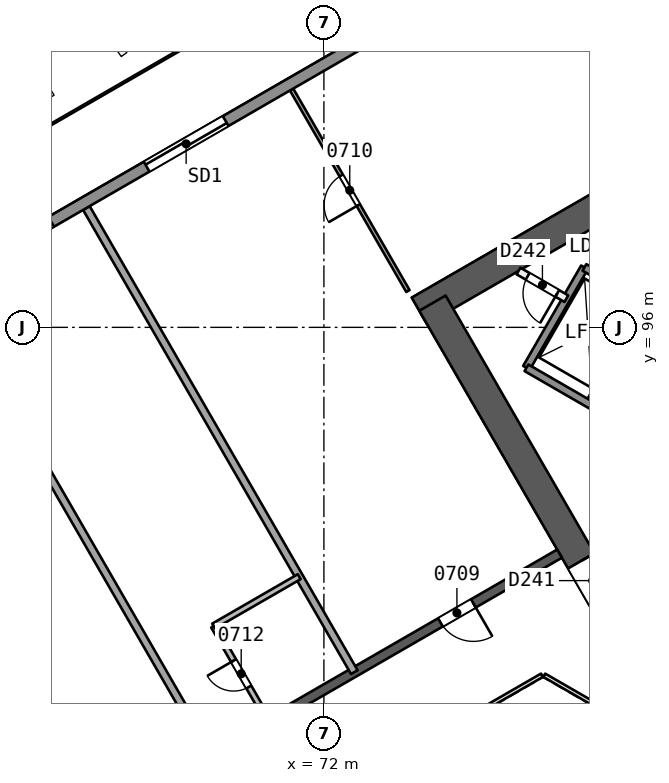
"""IFC4 building model, lengths in metres.
Left out: names, types, materials, properties, quantities, classifications, styles, units other than length and angle.
Written with IfcOpenShell. Run it as: python <this file> out.ifc"""

import sys

from ifc_helpers import new_model, si_unit, direction, frame, frame_2d, origin, place, context, subcontext, project, spatial, rectangle, extrude, element, fill, save


model = new_model("IFC4")
c1 = context("Model", 3, precision=1e-05, world=origin(), true_north=direction((0.0, 1.0)))
c2 = subcontext(c1, "Body", "Model", "MODEL_VIEW")
j1 = project(units=[si_unit("LENGTHUNIT", "METRE"), si_unit("PLANEANGLEUNIT", "RADIAN")], contexts=[c1])
p1 = place(None, origin())
s1 = spatial("IfcSite", under=j1, at=p1, CompositionType="ELEMENT")
p2 = place(p1, origin())
s2 = spatial("IfcBuilding", under=s1, at=p2, CompositionType="ELEMENT")
p3 = place(p2, frame((0.0, 0.0, 37.4)))
s3 = spatial("IfcBuildingStorey", under=s2, at=p3, CompositionType="ELEMENT", Elevation=37.4)
p4 = place(p3, frame((65.538, 80.0, 0.0), z_axis=(0.0, 0.0, 1.0), x_axis=(-0.49999662545, 0.866027352073, 0.0)))
e1 = element("IfcWall", 1, at=p4, inside=s3, PredefinedType="SHEAR", context=c2, shape_type="SweptSolid", body=[
    extrude(rectangle(XDim=10.149, YDim=0.8, at=frame_2d((5.074, 0.0))), origin(), (0.0, 0.0, 1.0), 3.7),
])
p5 = place(p4, frame((0.719, 0.0, 0.0)))
e2 = element("IfcOpeningElement", 2, at=p5, cuts=e1, PredefinedType="OPENING", context=c2, shape_type="SweptSolid", body=[
    extrude(rectangle(XDim=1.2, YDim=2.1, at=frame_2d((0.6, 1.05))), frame((0.0, 0.411, 0.0), z_axis=(0.0, -1.0, 0.0), x_axis=(1.0, 0.0, 0.0)), (0.0, 0.0, 1.0), 0.821),
])
p6 = place(p3, frame((86.723, 103.488, 0.0), z_axis=(0.0, 0.0, 1.0), x_axis=(-0.866032504327, -0.499987701298, 0.0)))
e3 = element("IfcWall", 3, at=p6, inside=s3, PredefinedType="SHEAR", context=c2, shape_type="SweptSolid", body=[
    extrude(rectangle(XDim=14.102, YDim=0.8, at=frame_2d((7.051, 0.0))), origin(), (0.0, 0.0, 1.0), 3.7),
])
p7 = place(p3, frame((74.856, 96.637, 0.0), z_axis=(0.0, 0.0, 1.0), x_axis=(0.499993500917, -0.866029155999, 0.0)))
e4 = element("IfcWall", 4, at=p7, inside=s3, PredefinedType="SHEAR", context=c2, shape_type="SweptSolid", body=[
    extrude(rectangle(XDim=9.98, YDim=0.8, at=frame_2d((4.99, 0.0))), origin(), (0.0, 0.0, 1.0), 3.7),
])
p8 = place(p7, frame((7.83, 0.0, 0.0)))
e5 = element("IfcOpeningElement", 5, at=p8, cuts=e4, PredefinedType="OPENING", context=c2, shape_type="SweptSolid", body=[
    extrude(rectangle(XDim=1.2, YDim=2.1, at=frame_2d((0.6, 1.05))), frame((0.0, 0.411, 0.0), z_axis=(0.0, -1.0, 0.0), x_axis=(1.0, 0.0, 0.0)), (0.0, 0.0, 1.0), 0.821),
])
p9 = place(p3, frame((78.2, 90.046, 0.0), z_axis=(0.0, 0.0, 1.0), x_axis=(-0.866026492143, -0.499998114903, 0.0)))
e6 = element("IfcWall", 6, at=p9, inside=s3, PredefinedType="SHEAR", context=c2, shape_type="SweptSolid", body=[
    extrude(rectangle(XDim=15.588, YDim=0.25, at=frame_2d((7.794, 0.0))), origin(), (0.0, 0.0, 1.0), 3.2),
])
p10 = place(p9, frame((2.618, 0.0, 0.0)))
e7 = element("IfcOpeningElement", 7, at=p10, cuts=e6, PredefinedType="OPENING", context=c2, shape_type="SweptSolid", body=[
    extrude(rectangle(XDim=1.0, YDim=2.1, at=frame_2d((0.5, 1.05))), frame((0.0, 0.135, 0.0), z_axis=(0.0, -1.0, 0.0), x_axis=(1.0, 0.0, 0.0)), (0.0, 0.0, 1.0), 0.271),
])
p11 = place(p9, frame((9.218, 0.0, 0.0)))
e8 = element("IfcOpeningElement", 8, at=p11, cuts=e6, PredefinedType="OPENING", context=c2, shape_type="SweptSolid", body=[
    extrude(rectangle(XDim=1.0, YDim=2.1, at=frame_2d((0.5, 1.05))), frame((0.0, 0.135, 0.0), z_axis=(0.0, -1.0, 0.0), x_axis=(1.0, 0.0, 0.0)), (0.0, 0.0, 1.0), 0.271),
])
p12 = place(p9, frame((12.594, 0.0, 0.0)))
e9 = element("IfcOpeningElement", 9, at=p12, cuts=e6, PredefinedType="OPENING", context=c2, shape_type="SweptSolid", body=[
    extrude(rectangle(XDim=1.0, YDim=2.1, at=frame_2d((0.5, 1.05))), frame((0.0, 0.135, 0.0), z_axis=(0.0, -1.0, 0.0), x_axis=(1.0, 0.0, 0.0)), (0.0, 0.0, 1.0), 0.271),
])
p13 = place(p3, frame((74.21, 96.956, 0.0), z_axis=(0.0, 0.0, 1.0), x_axis=(-0.499985929336, 0.866033527334, 0.0)))
e10 = element("IfcWall", 10, at=p13, inside=s3, PredefinedType="PARTITIONING", context=c2, shape_type="SweptSolid", body=[
    extrude(rectangle(XDim=6.123, YDim=0.1, at=frame_2d((3.062, 0.0))), origin(), (0.0, 0.0, 1.0), 3.2),
])
p14 = place(p13, frame((2.611, 0.0, 0.0)))
e11 = element("IfcOpeningElement", 11, at=p14, cuts=e10, PredefinedType="OPENING", context=c2, shape_type="SweptSolid", body=[
    extrude(rectangle(XDim=0.9, YDim=2.1, at=frame_2d((0.45, 1.05))), frame((0.0, 0.061, 0.0), z_axis=(0.0, -1.0, 0.0), x_axis=(1.0, 0.0, 0.0)), (0.0, 0.0, 1.0), 0.121),
])
p15 = place(p3, frame((65.749, 99.141, 0.0), z_axis=(0.0, 0.0, 1.0), x_axis=(0.499997206141, -0.866027016814, 0.0)))
e12 = element("IfcWall", 12, at=p15, inside=s3, PredefinedType="PARTITIONING", context=c2, shape_type="SweptSolid", body=[
    extrude(rectangle(XDim=14.102, YDim=0.2, at=frame_2d((7.051, 0.0))), origin(), (0.0, 0.0, 1.0), 3.2),
])
p16 = place(p3, frame((70.548, 85.628, 0.0), z_axis=(0.0, 0.0, 1.0), x_axis=(-0.499987231761, 0.866032775405, 0.0)))
e13 = element("IfcWall", 13, at=p16, inside=s3, PredefinedType="PARTITIONING", context=c2, shape_type="SweptSolid", body=[
    extrude(rectangle(XDim=2.9, YDim=0.15, at=frame_2d((1.45, 0.0))), origin(), (0.0, 0.0, 1.0), 3.2),
])
p17 = place(p16, frame((1.05, 0.0, 0.0)))
e14 = element("IfcOpeningElement", 14, at=p17, cuts=e13, PredefinedType="OPENING", context=c2, shape_type="SweptSolid", body=[
    extrude(rectangle(XDim=0.8, YDim=2.1, at=frame_2d((0.4, 1.05))), frame((0.0, 0.085, 0.0), z_axis=(0.0, -1.0, 0.0), x_axis=(1.0, 0.0, 0.0)), (0.0, 0.0, 1.0), 0.171),
])
p18 = place(p3, frame((69.098, 88.14, 0.0), z_axis=(0.0, 0.0, 1.0), x_axis=(0.866021400173, 0.500006934395, 0.0)))
e15 = element("IfcWall", 15, at=p18, inside=s3, PredefinedType="PARTITIONING", context=c2, shape_type="SweptSolid", body=[
    extrude(rectangle(XDim=2.6, YDim=0.15, at=frame_2d((1.3, 0.0))), origin(), (0.0, 0.0, 1.0), 3.2),
])
p19 = place(p3, frame((61.969, 96.958, 0.0), z_axis=(0.0, 0.0, 1.0), x_axis=(0.499997206141, -0.866027016814, 0.0)))
e16 = element("IfcWall", 16, at=p19, inside=s3, PredefinedType="PARTITIONING", context=c2, shape_type="SweptSolid", body=[
    extrude(rectangle(XDim=14.102, YDim=0.2, at=frame_2d((7.051, 0.0))), origin(), (0.0, 0.0, 1.0), 3.2),
])
p20 = place(p3, frame((37.74, 83.141, 0.0), z_axis=(0.0, 0.0, 1.0), x_axis=(0.866026524777, 0.499998058379, 0.0)))
e17 = element("IfcWall", 17, at=p20, inside=s3, PredefinedType="SOLIDWALL", context=c2, shape_type="SweptSolid", body=[
    extrude(rectangle(XDim=61.395, YDim=0.3, at=frame_2d((30.698, 0.0))), origin(), (0.0, 0.0, 1.0), 3.2),
])
p21 = place(p20, frame((34.174, 0.0, 0.0)))
e18 = element("IfcOpeningElement", 18, at=p21, cuts=e17, PredefinedType="OPENING", context=c2, shape_type="SweptSolid", body=[
    extrude(rectangle(XDim=2.4, YDim=2.4, at=frame_2d((1.2, 1.2))), frame((0.0, 0.161, 0.0), z_axis=(0.0, -1.0, 0.0), x_axis=(1.0, 0.0, 0.0)), (0.0, 0.0, 1.0), 0.321),
])
p22 = place(p20, frame((47.603, 0.0, 0.0)))
e19 = element("IfcOpeningElement", 19, at=p22, cuts=e17, PredefinedType="OPENING", context=c2, shape_type="SweptSolid", body=[
    extrude(rectangle(XDim=2.4, YDim=2.4, at=frame_2d((1.2, 1.2))), frame((0.0, 0.161, 0.0), z_axis=(0.0, -1.0, 0.0), x_axis=(1.0, 0.0, 0.0)), (0.0, 0.0, 1.0), 0.321),
])
p23 = place(p20, frame((24.198, 0.0, 0.0)))
e20 = element("IfcOpeningElement", 20, at=p23, cuts=e17, PredefinedType="OPENING", context=c2, shape_type="SweptSolid", body=[
    extrude(rectangle(XDim=2.4, YDim=2.4, at=frame_2d((1.2, 1.2))), frame((0.0, 0.161, 0.0), z_axis=(0.0, -1.0, 0.0), x_axis=(1.0, 0.0, 0.0)), (0.0, 0.0, 1.0), 0.321),
])
p24 = place(p20, frame((11.394, 0.0, 0.0)))
e21 = element("IfcOpeningElement", 21, at=p24, cuts=e17, PredefinedType="OPENING", context=c2, shape_type="SweptSolid", body=[
    extrude(rectangle(XDim=2.4, YDim=2.4, at=frame_2d((1.2, 1.2))), frame((0.0, 0.161, 0.0), z_axis=(0.0, -1.0, 0.0), x_axis=(1.0, 0.0, 0.0)), (0.0, 0.0, 1.0), 0.321),
])
p25 = place(p20, frame((28.874, 0.0, 0.0)))
e22 = element("IfcOpeningElement", 22, at=p25, cuts=e17, PredefinedType="OPENING", context=c2, shape_type="SweptSolid", body=[
    extrude(rectangle(XDim=2.4, YDim=2.4, at=frame_2d((1.2, 1.2))), frame((0.0, 0.161, 0.0), z_axis=(0.0, -1.0, 0.0), x_axis=(1.0, 0.0, 0.0)), (0.0, 0.0, 1.0), 0.321),
])
for number, where, z_axis, x_axis in (
    (23, (78.976, 93.986, 0.0), (0.0, 0.0, 1.0), (0.5, 0.866, 0.0)),
    (24, (77.33, 94.936, 0.0), (0.0, 0.0, 1.0), (0.5, 0.866, 0.0)),
):
    element("IfcWall", number, at=place(p3, frame(where, z_axis=z_axis, x_axis=x_axis)), inside=s3, PredefinedType="SOLIDWALL", context=c2, shape_type="SweptSolid", body=[
        extrude(rectangle(XDim=3.05, YDim=0.2, at=frame_2d((1.525, 0.0))), origin(), (0.0, 0.0, 1.0), 3.2),
    ])
p26 = place(p3, frame((86.77, 89.486, 0.0), z_axis=(0.0, 0.0, 1.0), x_axis=(-0.86601811187, 0.500012629753, 0.0)))
e25 = element("IfcWall", 25, at=p26, inside=s3, PredefinedType="SOLIDWALL", context=c2, shape_type="SweptSolid", body=[
    extrude(rectangle(XDim=10.9, YDim=0.2, at=frame_2d((5.45, 0.0))), origin(), (0.0, 0.0, 1.0), 3.2),
])
p27 = place(p3, frame((78.38, 96.755, 0.0), z_axis=(0.0, 0.0, 1.0), x_axis=(-0.866003949776, 0.500037157592, 0.0)))
e26 = element("IfcWall", 26, at=p27, inside=s3, PredefinedType="PARTITIONING", context=c2, shape_type="SweptSolid", body=[
    extrude(rectangle(XDim=1.455, YDim=0.2, at=frame_2d((0.728, 0.0))), origin(), (0.0, 0.0, 1.0), 3.2),
])
p28 = place(p27, frame((0.278, 0.0, 0.0)))
e27 = element("IfcOpeningElement", 27, at=p28, cuts=e26, PredefinedType="OPENING", context=c2, shape_type="SweptSolid", body=[
    extrude(rectangle(XDim=0.9, YDim=2.1, at=frame_2d((0.45, 1.05))), frame((0.0, 0.11, 0.0), z_axis=(0.0, -1.0, 0.0), x_axis=(1.0, 0.0, 0.0)), (0.0, 0.0, 1.0), 0.221),
])
p29 = place(p3, frame((80.5, 96.627, 0.0), z_axis=(0.0, 0.0, 1.0), x_axis=(-0.86601224135, 0.500022797313, 0.0)))
e28 = element("IfcWall", 28, at=p29, inside=s3, PredefinedType="SOLIDWALL", context=c2, shape_type="SweptSolid", body=[
    extrude(rectangle(XDim=1.9, YDim=0.2, at=frame_2d((0.95, 0.0))), origin(), (0.0, 0.0, 1.0), 3.2),
])
p30 = place(p29, frame((0.4, 0.0, 0.0)))
e29 = element("IfcOpeningElement", 29, at=p30, cuts=e28, PredefinedType="OPENING", context=c2, shape_type="SweptSolid", body=[
    extrude(rectangle(XDim=1.1, YDim=2.1, at=frame_2d((0.55, 1.05))), frame((0.0, 0.11, 0.0), z_axis=(0.0, -1.0, 0.0), x_axis=(1.0, 0.0, 0.0)), (0.0, 0.0, 1.0), 0.221),
])
p31 = place(p3, frame((79.53, 85.846, 0.0), z_axis=(0.0, 0.0, 1.0), x_axis=(-0.866041268327, 0.499972520799, 0.0)))
e30 = element("IfcWall", 30, at=p31, inside=s3, PredefinedType="PARTITIONING", context=c2, shape_type="SweptSolid", body=[
    extrude(rectangle(XDim=2.0, YDim=0.1, at=frame_2d((1.0, 0.0))), origin(), (0.0, 0.0, 1.0), 3.2),
])
p32 = place(p3, frame((77.738, 86.846, 0.0), z_axis=(0.0, 0.0, 1.0), x_axis=(-0.866026658274, -0.499997827154, 0.0)))
e31 = element("IfcWall", 31, at=p32, inside=s3, PredefinedType="PARTITIONING", context=c2, shape_type="SweptSolid", body=[
    extrude(rectangle(XDim=11.588, YDim=0.1, at=frame_2d((5.794, 0.0))), origin(), (0.0, 0.0, 1.0), 3.2),
])
p33 = place(p10, origin())
e32 = element("IfcDoor", 32, at=p33, inside=s3, OperationType="SINGLE_SWING_LEFT", PredefinedType="NOTDEFINED", context=c2, shape_type="SweptSolid", body=[
    extrude(rectangle(XDim=1.0, YDim=2.1, at=frame_2d((0.5, 1.05))), frame((0.0, 0.025, 0.0), z_axis=(0.0, -1.0, 0.0), x_axis=(1.0, 0.0, 0.0)), (0.0, 0.0, 1.0), 0.05),
])
fill(e7, e32)
p34 = place(p14, origin())
e33 = element("IfcDoor", 33, at=p34, inside=s3, OperationType="SINGLE_SWING_LEFT", PredefinedType="NOTDEFINED", context=c2, shape_type="SweptSolid", body=[
    extrude(rectangle(XDim=0.9, YDim=2.1, at=frame_2d((0.45, 1.05))), frame((0.0, 0.025, 0.0), z_axis=(0.0, -1.0, 0.0), x_axis=(1.0, 0.0, 0.0)), (0.0, 0.0, 1.0), 0.05),
])
fill(e11, e33)
p35 = place(p17, origin())
e34 = element("IfcDoor", 34, at=p35, inside=s3, OperationType="SINGLE_SWING_RIGHT", PredefinedType="NOTDEFINED", context=c2, shape_type="SweptSolid", body=[
    extrude(rectangle(XDim=0.8, YDim=2.1, at=frame_2d((0.4, 1.05))), frame((0.0, 0.025, 0.0), z_axis=(0.0, -1.0, 0.0), x_axis=(1.0, 0.0, 0.0)), (0.0, 0.0, 1.0), 0.05),
])
fill(e14, e34)
p36 = place(p21, origin())
e35 = element("IfcDoor", 35, at=p36, inside=s3, OperationType="SLIDING_TO_LEFT", PredefinedType="NOTDEFINED", context=c2, shape_type="SweptSolid", body=[
    extrude(rectangle(XDim=2.4, YDim=2.4, at=frame_2d((1.2, 1.2))), frame((0.0, 0.025, 0.0), z_axis=(0.0, -1.0, 0.0), x_axis=(1.0, 0.0, 0.0)), (0.0, 0.0, 1.0), 0.05),
])
fill(e18, e35)
p37 = place(p8, origin())
e36 = element("IfcDoor", 36, at=p37, inside=s3, OperationType="SINGLE_SWING_LEFT", PredefinedType="NOTDEFINED", context=c2, shape_type="SweptSolid", body=[
    extrude(rectangle(XDim=1.2, YDim=2.1, at=frame_2d((0.6, 1.05))), frame((0.0, 0.025, 0.0), z_axis=(0.0, -1.0, 0.0), x_axis=(1.0, 0.0, 0.0)), (0.0, 0.0, 1.0), 0.05),
])
fill(e5, e36)
p38 = place(p28, origin())
e37 = element("IfcDoor", 37, at=p38, inside=s3, OperationType="SINGLE_SWING_LEFT", PredefinedType="NOTDEFINED", context=c2, shape_type="SweptSolid", body=[
    extrude(rectangle(XDim=0.9, YDim=2.1, at=frame_2d((0.45, 1.05))), frame((0.0, 0.025, 0.0), z_axis=(0.0, -1.0, 0.0), x_axis=(1.0, 0.0, 0.0)), (0.0, 0.0, 1.0), 0.05),
])
fill(e27, e37)
save(model, sys.argv[1])
